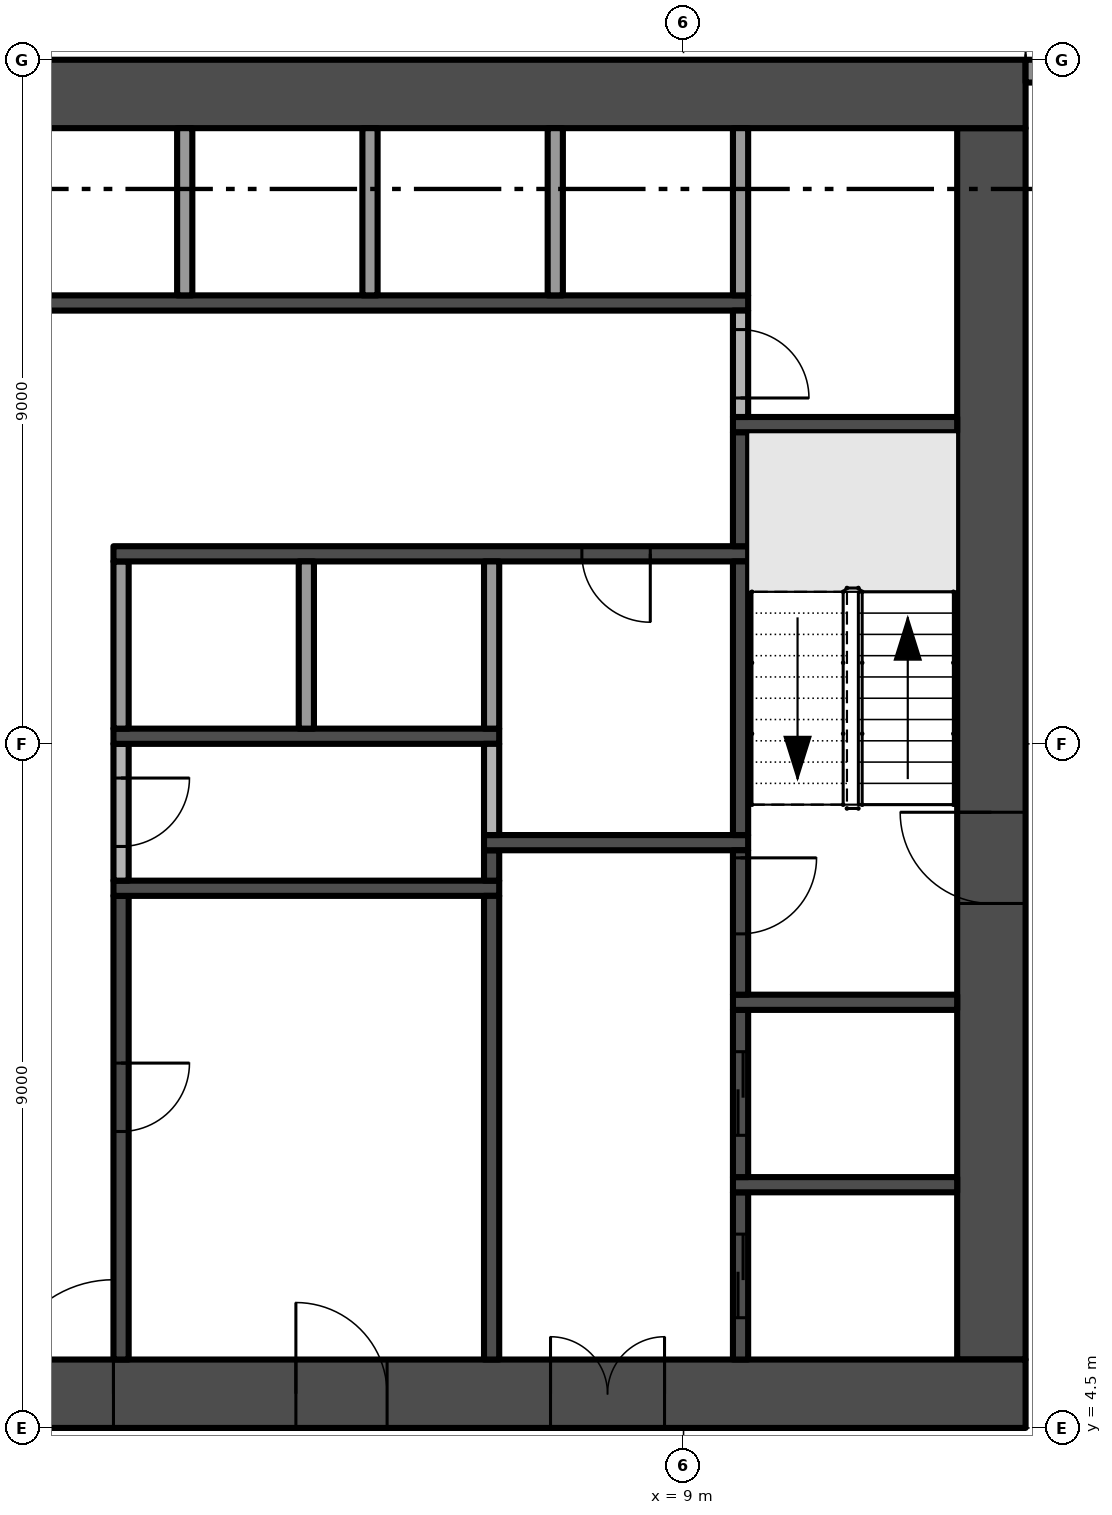
"""IFC4 building model, lengths in metres.
Left out: names, types, materials, properties, quantities, classifications, styles, units other than length and angle.
Written with IfcOpenShell. Run it as: python <this file> out.ifc"""

import sys

from ifc_helpers import new_model, si_unit, direction, frame, frame_2d, origin, place, context, subcontext, project, spatial, rectangle, extrude, element, fill, save


model = new_model("IFC4")
c1 = context("Model", 3, precision=1e-05, world=origin(), true_north=direction((0.0, 1.0)))
c2 = subcontext(c1, "Body", "Model", "MODEL_VIEW")
j1 = project(units=[si_unit("LENGTHUNIT", "METRE"), si_unit("PLANEANGLEUNIT", "RADIAN")], contexts=[c1])
p1 = place(None, origin())
s1 = spatial("IfcSite", under=j1, at=p1, CompositionType="ELEMENT")
p2 = place(p1, origin())
s2 = spatial("IfcBuilding", under=s1, at=p2, CompositionType="ELEMENT")
p3 = place(p2, frame((0.0, 0.0, 15.0)))
s3 = spatial("IfcBuildingStorey", under=s2, at=p3, CompositionType="ELEMENT", Elevation=15.0)
p4 = place(p3, frame((-13.5, 4.95, -0.3), z_axis=(0.0, 0.0, 1.0), x_axis=(1.0, 0.0, 0.0)))
e1 = element("IfcWall", 1, at=p4, inside=s3, PredefinedType="SHEAR", context=c2, shape_type="SweptSolid", body=[
    extrude(rectangle(XDim=27.0, YDim=0.9, at=frame_2d((13.5, 0.0))), origin(), (0.0, 0.0, 1.0), 3.8),
])
p5 = place(p4, frame((12.0, 0.0, 0.3)))
e2 = element("IfcOpeningElement", 2, at=p5, cuts=e1, PredefinedType="OPENING", context=c2, shape_type="SweptSolid", body=[
    extrude(rectangle(XDim=3.0, YDim=2.4, at=frame_2d((1.5, 1.2))), frame((0.0, 0.46, 0.0), z_axis=(0.0, -1.0, 0.0), x_axis=(1.0, 0.0, 0.0)), (0.0, 0.0, 1.0), 0.92),
])
p6 = place(p4, frame((4.9, 0.0, 0.3)))
e3 = element("IfcOpeningElement", 3, at=p6, cuts=e1, PredefinedType="OPENING", context=c2, shape_type="SweptSolid", body=[
    extrude(rectangle(XDim=1.2, YDim=2.2, at=frame_2d((0.6, 1.1))), frame((0.0, 0.46, 0.0), z_axis=(0.0, -1.0, 0.0), x_axis=(1.0, 0.0, 0.0)), (0.0, 0.0, 1.0), 0.92),
])
p7 = place(p4, frame((20.75, 0.0, 0.3)))
e4 = element("IfcOpeningElement", 4, at=p7, cuts=e1, PredefinedType="OPENING", context=c2, shape_type="SweptSolid", body=[
    extrude(rectangle(XDim=1.5, YDim=2.2, at=frame_2d((0.75, 1.1))), frame((0.0, 0.46, 0.0), z_axis=(0.0, -1.0, 0.0), x_axis=(1.0, 0.0, 0.0)), (0.0, 0.0, 1.0), 0.92),
])
p8 = place(p4, frame((17.4, 0.0, 0.3)))
e5 = element("IfcOpeningElement", 5, at=p8, cuts=e1, PredefinedType="OPENING", context=c2, shape_type="SweptSolid", body=[
    extrude(rectangle(XDim=1.2, YDim=2.2, at=frame_2d((0.6, 1.1))), frame((0.0, 0.46, 0.0), z_axis=(0.0, -1.0, 0.0), x_axis=(1.0, 0.0, 0.0)), (0.0, 0.0, 1.0), 0.92),
])
p9 = place(p3, frame((13.05, 5.4, -0.3), z_axis=(0.0, 0.0, 1.0), x_axis=(0.0, 1.0, 0.0)))
e6 = element("IfcWall", 6, at=p9, inside=s3, PredefinedType="SHEAR", context=c2, shape_type="SweptSolid", body=[
    extrude(rectangle(XDim=16.2, YDim=0.9, at=frame_2d((8.1, 0.0))), origin(), (0.0, 0.0, 1.0), 3.8),
])
p10 = place(p9, frame((6.0, 0.0, 0.3)))
e7 = element("IfcOpeningElement", 7, at=p10, cuts=e6, PredefinedType="OPENING", context=c2, shape_type="SweptSolid", body=[
    extrude(rectangle(XDim=1.2, YDim=2.2, at=frame_2d((0.6, 1.1))), frame((0.0, 0.46, 0.0), z_axis=(0.0, -1.0, 0.0), x_axis=(1.0, 0.0, 0.0)), (0.0, 0.0, 1.0), 0.92),
])
p11 = place(p3, frame((13.5, 22.05, -0.3), z_axis=(0.0, 0.0, 1.0), x_axis=(-1.0, 0.0, 0.0)))
e8 = element("IfcWall", 8, at=p11, inside=s3, PredefinedType="SHEAR", context=c2, shape_type="SweptSolid", body=[
    extrude(rectangle(XDim=27.0, YDim=0.9, at=frame_2d((13.5, 0.0))), origin(), (0.0, 0.0, 1.0), 3.8),
])
p12 = place(p3, frame((13.5, 22.35, 0.0), z_axis=(0.0, 0.0, 1.0), x_axis=(1.0, 0.0, 0.0)))
e9 = element("IfcWall", 9, at=p12, inside=s3, PredefinedType="SOLIDWALL", context=c2, shape_type="SweptSolid", body=[
    extrude(rectangle(XDim=3.75, YDim=0.3, at=frame_2d((1.875, 0.0))), origin(), (0.0, 0.0, 1.0), 3.5),
])
p13 = place(p12, frame((0.85, 0.0, 0.45)))
e10 = element("IfcOpeningElement", 10, at=p13, cuts=e9, PredefinedType="OPENING", context=c2, shape_type="SweptSolid", body=[
    extrude(rectangle(XDim=2.6, YDim=2.65, at=frame_2d((1.3, 1.325))), frame((0.0, 0.16, 0.0), z_axis=(0.0, -1.0, 0.0), x_axis=(1.0, 0.0, 0.0)), (0.0, 0.0, 1.0), 0.32),
])
p14 = place(p3, frame((-9.85, 19.3, 0.0), z_axis=(0.0, 0.0, 1.0), x_axis=(1.0, 0.0, 0.0)))
e11 = element("IfcWall", 11, at=p14, inside=s3, PredefinedType="SHEAR", context=c2, shape_type="SweptSolid", body=[
    extrude(rectangle(XDim=19.7, YDim=0.2, at=frame_2d((9.85, 0.0))), origin(), (0.0, 0.0, 1.0), 3.5),
])
p15 = place(p14, frame((0.769, 0.0, 0.0)))
e12 = element("IfcOpeningElement", 12, at=p15, cuts=e11, PredefinedType="OPENING", context=c2, shape_type="SweptSolid", body=[
    extrude(rectangle(XDim=1.1, YDim=2.1, at=frame_2d((0.55, 1.05))), frame((0.0, 0.11, 0.0), z_axis=(0.0, -1.0, 0.0), x_axis=(1.0, 0.0, 0.0)), (0.0, 0.0, 1.0), 0.22),
])
p16 = place(p14, frame((3.206, 0.0, 0.0)))
e13 = element("IfcOpeningElement", 13, at=p16, cuts=e11, PredefinedType="OPENING", context=c2, shape_type="SweptSolid", body=[
    extrude(rectangle(XDim=1.1, YDim=2.1, at=frame_2d((0.55, 1.05))), frame((0.0, 0.11, 0.0), z_axis=(0.0, -1.0, 0.0), x_axis=(1.0, 0.0, 0.0)), (0.0, 0.0, 1.0), 0.22),
])
p17 = place(p14, frame((5.644, 0.0, 0.0)))
e14 = element("IfcOpeningElement", 14, at=p17, cuts=e11, PredefinedType="OPENING", context=c2, shape_type="SweptSolid", body=[
    extrude(rectangle(XDim=1.1, YDim=2.1, at=frame_2d((0.55, 1.05))), frame((0.0, 0.11, 0.0), z_axis=(0.0, -1.0, 0.0), x_axis=(1.0, 0.0, 0.0)), (0.0, 0.0, 1.0), 0.22),
])
p18 = place(p14, frame((8.081, 0.0, 0.0)))
e15 = element("IfcOpeningElement", 15, at=p18, cuts=e11, PredefinedType="OPENING", context=c2, shape_type="SweptSolid", body=[
    extrude(rectangle(XDim=1.1, YDim=2.1, at=frame_2d((0.55, 1.05))), frame((0.0, 0.11, 0.0), z_axis=(0.0, -1.0, 0.0), x_axis=(1.0, 0.0, 0.0)), (0.0, 0.0, 1.0), 0.22),
])
p19 = place(p3, frame((1.6, 11.5, 0.0), z_axis=(0.0, 0.0, 1.0), x_axis=(0.0, -1.0, 0.0)))
e16 = element("IfcWall", 16, at=p19, inside=s3, PredefinedType="SHEAR", context=c2, shape_type="SweptSolid", body=[
    extrude(rectangle(XDim=6.1, YDim=0.2, at=frame_2d((3.05, 0.0))), origin(), (0.0, 0.0, 1.0), 3.5),
])
p20 = place(p19, frame((2.2, 0.0, 0.0)))
e17 = element("IfcOpeningElement", 17, at=p20, cuts=e16, PredefinedType="OPENING", context=c2, shape_type="SweptSolid", body=[
    extrude(rectangle(XDim=0.9, YDim=2.1, at=frame_2d((0.45, 1.05))), frame((0.0, 0.11, 0.0), z_axis=(0.0, -1.0, 0.0), x_axis=(1.0, 0.0, 0.0)), (0.0, 0.0, 1.0), 0.22),
])
p21 = place(p3, frame((1.5, 11.6, 0.0), z_axis=(0.0, 0.0, 1.0), x_axis=(1.0, 0.0, 0.0)))
e18 = element("IfcWall", 18, at=p21, inside=s3, PredefinedType="SHEAR", context=c2, shape_type="SweptSolid", body=[
    extrude(rectangle(XDim=5.075, YDim=0.2, at=frame_2d((2.538, 0.0))), origin(), (0.0, 0.0, 1.0), 3.5),
])
p22 = place(p3, frame((1.6, 13.5, 0.0), z_axis=(0.0, 0.0, 1.0), x_axis=(0.0, -1.0, 0.0)))
e19 = element("IfcWall", 19, at=p22, inside=s3, PredefinedType="PARTITIONING", context=c2, shape_type="SweptSolid", body=[
    extrude(rectangle(XDim=1.8, YDim=0.2, at=frame_2d((0.9, 0.0))), origin(), (0.0, 0.0, 1.0), 3.5),
])
p23 = place(p22, frame((0.45, 0.0, 0.0)))
e20 = element("IfcOpeningElement", 20, at=p23, cuts=e19, PredefinedType="OPENING", context=c2, shape_type="SweptSolid", body=[
    extrude(rectangle(XDim=0.9, YDim=2.1, at=frame_2d((0.45, 1.05))), frame((0.0, 0.11, 0.0), z_axis=(0.0, -1.0, 0.0), x_axis=(1.0, 0.0, 0.0)), (0.0, 0.0, 1.0), 0.22),
])
p24 = place(p3, frame((1.5, 13.6, 0.0), z_axis=(0.0, 0.0, 1.0), x_axis=(1.0, 0.0, 0.0)))
e21 = element("IfcWall", 21, at=p24, inside=s3, PredefinedType="SHEAR", context=c2, shape_type="SweptSolid", body=[
    extrude(rectangle(XDim=5.075, YDim=0.2, at=frame_2d((2.538, 0.0))), origin(), (0.0, 0.0, 1.0), 3.5),
])
p25 = place(p3, frame((1.6, 13.7, 0.0), z_axis=(0.0, 0.0, 1.0), x_axis=(0.0, 1.0, 0.0)))
e22 = element("IfcWall", 22, at=p25, inside=s3, PredefinedType="PARTITIONING", context=c2, shape_type="SweptSolid", body=[
    extrude(rectangle(XDim=2.2, YDim=0.2, at=frame_2d((1.1, 0.0))), origin(), (0.0, 0.0, 1.0), 3.5),
])
p26 = place(p3, frame((9.85, 16.0, 0.0), z_axis=(0.0, 0.0, 1.0), x_axis=(-1.0, 0.0, 0.0)))
e23 = element("IfcWall", 23, at=p26, inside=s3, PredefinedType="SHEAR", context=c2, shape_type="SweptSolid", body=[
    extrude(rectangle(XDim=8.35, YDim=0.2, at=frame_2d((4.175, 0.0))), origin(), (0.0, 0.0, 1.0), 3.5),
])
p27 = place(p26, frame((1.288, 0.0, 0.0)))
e24 = element("IfcOpeningElement", 24, at=p27, cuts=e23, PredefinedType="OPENING", context=c2, shape_type="SweptSolid", body=[
    extrude(rectangle(XDim=0.9, YDim=2.1, at=frame_2d((0.45, 1.05))), frame((0.0, 0.11, 0.0), z_axis=(0.0, -1.0, 0.0), x_axis=(1.0, 0.0, 0.0)), (0.0, 0.0, 1.0), 0.22),
])
for number, where, z_axis, x_axis in (
    (25, (2.438, 19.4, 0.0), (0.0, 0.0, 1.0), (0.0, 1.0, 0.0)),
    (26, (4.037, 13.7, 0.0), (0.0, 0.0, 1.0), (0.0, 1.0, 0.0)),
    (27, (4.875, 19.4, 0.0), (0.0, 0.0, 1.0), (0.0, 1.0, 0.0)),
):
    element("IfcWall", number, at=place(p3, frame(where, z_axis=z_axis, x_axis=x_axis)), inside=s3, PredefinedType="PARTITIONING", context=c2, shape_type="SweptSolid", body=[
        extrude(rectangle(XDim=2.2, YDim=0.2, at=frame_2d((1.1, 0.0))), origin(), (0.0, 0.0, 1.0), 3.5),
    ])
p28 = place(p3, frame((6.475, 5.4, 0.0), z_axis=(0.0, 0.0, 1.0), x_axis=(0.0, 1.0, 0.0)))
e28 = element("IfcWall", 28, at=p28, inside=s3, PredefinedType="SHEAR", context=c2, shape_type="SweptSolid", body=[
    extrude(rectangle(XDim=6.1, YDim=0.2, at=frame_2d((3.05, 0.0))), origin(), (0.0, 0.0, 1.0), 3.5),
])
p29 = place(p3, frame((6.475, 11.7, 0.0), z_axis=(0.0, 0.0, 1.0), x_axis=(0.0, 1.0, 0.0)))
e29 = element("IfcWall", 29, at=p29, inside=s3, PredefinedType="SHEAR", context=c2, shape_type="SweptSolid", body=[
    extrude(rectangle(XDim=0.4, YDim=0.2, at=frame_2d((0.2, 0.0))), origin(), (0.0, 0.0, 1.0), 3.5),
])
p30 = place(p3, frame((6.375, 12.2, 0.0), z_axis=(0.0, 0.0, 1.0), x_axis=(1.0, 0.0, 0.0)))
e30 = element("IfcWall", 30, at=p30, inside=s3, PredefinedType="SHEAR", context=c2, shape_type="SweptSolid", body=[
    extrude(rectangle(XDim=3.475, YDim=0.2, at=frame_2d((1.738, 0.0))), origin(), (0.0, 0.0, 1.0), 3.5),
])
p31 = place(p3, frame((6.475, 12.3, 0.0), z_axis=(0.0, 0.0, 1.0), x_axis=(0.0, 1.0, 0.0)))
e31 = element("IfcWall", 31, at=p31, inside=s3, PredefinedType="PARTITIONING", context=c2, shape_type="SweptSolid", body=[
    extrude(rectangle(XDim=1.2, YDim=0.2, at=frame_2d((0.6, 0.0))), origin(), (0.0, 0.0, 1.0), 3.5),
])
for number, where, z_axis, x_axis in (
    (32, (6.475, 13.7, 0.0), (0.0, 0.0, 1.0), (0.0, 1.0, 0.0)),
    (33, (7.312, 19.4, 0.0), (0.0, 0.0, 1.0), (0.0, 1.0, 0.0)),
):
    element("IfcWall", number, at=place(p3, frame(where, z_axis=z_axis, x_axis=x_axis)), inside=s3, PredefinedType="PARTITIONING", context=c2, shape_type="SweptSolid", body=[
        extrude(rectangle(XDim=2.2, YDim=0.2, at=frame_2d((1.1, 0.0))), origin(), (0.0, 0.0, 1.0), 3.5),
    ])
p32 = place(p3, frame((9.75, 5.4, 0.0), z_axis=(0.0, 0.0, 1.0), x_axis=(0.0, 1.0, 0.0)))
e34 = element("IfcWall", 34, at=p32, inside=s3, PredefinedType="SHEAR", context=c2, shape_type="SweptSolid", body=[
    extrude(rectangle(XDim=2.2, YDim=0.2, at=frame_2d((1.1, 0.0))), origin(), (0.0, 0.0, 1.0), 3.5),
])
p33 = place(p32, frame((0.55, 0.0, 0.0)))
e35 = element("IfcOpeningElement", 35, at=p33, cuts=e34, PredefinedType="OPENING", context=c2, shape_type="SweptSolid", body=[
    extrude(rectangle(XDim=1.1, YDim=2.1, at=frame_2d((0.55, 1.05))), frame((0.0, 0.11, 0.0), z_axis=(0.0, -1.0, 0.0), x_axis=(1.0, 0.0, 0.0)), (0.0, 0.0, 1.0), 0.22),
])
p34 = place(p3, frame((9.65, 7.7, 0.0), z_axis=(0.0, 0.0, 1.0), x_axis=(1.0, 0.0, 0.0)))
e36 = element("IfcWall", 36, at=p34, inside=s3, PredefinedType="SHEAR", context=c2, shape_type="SweptSolid", body=[
    extrude(rectangle(XDim=2.95, YDim=0.2, at=frame_2d((1.475, 0.0))), origin(), (0.0, 0.0, 1.0), 3.5),
])
p35 = place(p3, frame((9.75, 7.8, 0.0), z_axis=(0.0, 0.0, 1.0), x_axis=(0.0, 1.0, 0.0)))
e37 = element("IfcWall", 37, at=p35, inside=s3, PredefinedType="SHEAR", context=c2, shape_type="SweptSolid", body=[
    extrude(rectangle(XDim=2.2, YDim=0.2, at=frame_2d((1.1, 0.0))), origin(), (0.0, 0.0, 1.0), 3.5),
])
p36 = place(p35, frame((0.55, 0.0, 0.0)))
e38 = element("IfcOpeningElement", 38, at=p36, cuts=e37, PredefinedType="OPENING", context=c2, shape_type="SweptSolid", body=[
    extrude(rectangle(XDim=1.1, YDim=2.1, at=frame_2d((0.55, 1.05))), frame((0.0, 0.11, 0.0), z_axis=(0.0, -1.0, 0.0), x_axis=(1.0, 0.0, 0.0)), (0.0, 0.0, 1.0), 0.22),
])
p37 = place(p3, frame((9.65, 10.1, 0.0), z_axis=(0.0, 0.0, 1.0), x_axis=(1.0, 0.0, 0.0)))
e39 = element("IfcWall", 39, at=p37, inside=s3, PredefinedType="SHEAR", context=c2, shape_type="SweptSolid", body=[
    extrude(rectangle(XDim=2.95, YDim=0.2, at=frame_2d((1.475, 0.0))), origin(), (0.0, 0.0, 1.0), 3.5),
])
p38 = place(p3, frame((9.75, 12.1, 0.0), z_axis=(0.0, 0.0, 1.0), x_axis=(0.0, -1.0, 0.0)))
e40 = element("IfcWall", 40, at=p38, inside=s3, PredefinedType="SHEAR", context=c2, shape_type="SweptSolid", body=[
    extrude(rectangle(XDim=1.9, YDim=0.2, at=frame_2d((0.95, 0.0))), origin(), (0.0, 0.0, 1.0), 3.5),
])
p39 = place(p38, frame((0.1, 0.0, 0.0)))
e41 = element("IfcOpeningElement", 41, at=p39, cuts=e40, PredefinedType="OPENING", context=c2, shape_type="SweptSolid", body=[
    extrude(rectangle(XDim=1.0, YDim=2.2, at=frame_2d((0.5, 1.1))), frame((0.0, 0.11, 0.0), z_axis=(0.0, -1.0, 0.0), x_axis=(1.0, 0.0, 0.0)), (0.0, 0.0, 1.0), 0.22),
])
p40 = place(p3, frame((9.75, 12.3, 0.0), z_axis=(0.0, 0.0, 1.0), x_axis=(0.0, 1.0, 0.0)))
e42 = element("IfcWall", 42, at=p40, inside=s3, PredefinedType="SHEAR", context=c2, shape_type="SweptSolid", body=[
    extrude(rectangle(XDim=3.6, YDim=0.2, at=frame_2d((1.8, 0.0))), origin(), (0.0, 0.0, 1.0), 3.5),
])
p41 = place(p3, frame((9.75, 16.1, 0.0), z_axis=(0.0, 0.0, 1.0), x_axis=(0.0, 1.0, 0.0)))
e43 = element("IfcWall", 43, at=p41, inside=s3, PredefinedType="SHEAR", context=c2, shape_type="SweptSolid", body=[
    extrude(rectangle(XDim=1.5, YDim=0.2, at=frame_2d((0.75, 0.0))), origin(), (0.0, 0.0, 1.0), 3.5),
])
p42 = place(p3, frame((9.65, 17.7, 0.0), z_axis=(0.0, 0.0, 1.0), x_axis=(1.0, 0.0, 0.0)))
e44 = element("IfcWall", 44, at=p42, inside=s3, PredefinedType="SHEAR", context=c2, shape_type="SweptSolid", body=[
    extrude(rectangle(XDim=2.95, YDim=0.2, at=frame_2d((1.475, 0.0))), origin(), (0.0, 0.0, 1.0), 3.5),
])
p43 = place(p3, frame((9.75, 19.2, 0.0), z_axis=(0.0, 0.0, 1.0), x_axis=(0.0, -1.0, 0.0)))
e45 = element("IfcWall", 45, at=p43, inside=s3, PredefinedType="PARTITIONING", context=c2, shape_type="SweptSolid", body=[
    extrude(rectangle(XDim=1.4, YDim=0.2, at=frame_2d((0.7, 0.0))), origin(), (0.0, 0.0, 1.0), 3.5),
])
p44 = place(p43, frame((0.25, 0.0, 0.0)))
e46 = element("IfcOpeningElement", 46, at=p44, cuts=e45, PredefinedType="OPENING", context=c2, shape_type="SweptSolid", body=[
    extrude(rectangle(XDim=0.9, YDim=2.1, at=frame_2d((0.45, 1.05))), frame((0.0, 0.11, 0.0), z_axis=(0.0, -1.0, 0.0), x_axis=(1.0, 0.0, 0.0)), (0.0, 0.0, 1.0), 0.22),
])
p45 = place(p3, frame((9.75, 19.4, 0.0), z_axis=(0.0, 0.0, 1.0), x_axis=(0.0, 1.0, 0.0)))
e47 = element("IfcWall", 47, at=p45, inside=s3, PredefinedType="PARTITIONING", context=c2, shape_type="SweptSolid", body=[
    extrude(rectangle(XDim=2.2, YDim=0.2, at=frame_2d((1.1, 0.0))), origin(), (0.0, 0.0, 1.0), 3.5),
])
p46 = place(p5, frame((3.0, 0.0, 0.0), z_axis=(0.0, 0.0, 1.0), x_axis=(-1.0, 0.0, 0.0)))
e48 = element("IfcDoor", 48, at=p46, inside=s3, OperationType="DOUBLE_DOOR_SINGLE_SWING", PredefinedType="DOOR", context=c2, shape_type="SweptSolid", body=[
    extrude(rectangle(XDim=3.0, YDim=2.4, at=frame_2d((1.5, 1.2))), frame((0.0, 0.025, 0.0), z_axis=(0.0, -1.0, 0.0), x_axis=(1.0, 0.0, 0.0)), (0.0, 0.0, 1.0), 0.05),
])
fill(e2, e48)
p47 = place(p10, frame((1.2, 0.0, 0.0), z_axis=(0.0, 0.0, 1.0), x_axis=(-1.0, 0.0, 0.0)))
e49 = element("IfcDoor", 49, at=p47, inside=s3, OperationType="SINGLE_SWING_LEFT", PredefinedType="DOOR", context=c2, shape_type="SweptSolid", body=[
    extrude(rectangle(XDim=1.2, YDim=2.2, at=frame_2d((0.6, 1.1))), frame((0.0, 0.025, 0.0), z_axis=(0.0, -1.0, 0.0), x_axis=(1.0, 0.0, 0.0)), (0.0, 0.0, 1.0), 0.05),
])
fill(e7, e49)
p48 = place(p7, frame((1.5, 0.0, 0.0), z_axis=(0.0, 0.0, 1.0), x_axis=(-1.0, 0.0, 0.0)))
e50 = element("IfcDoor", 50, at=p48, inside=s3, OperationType="DOUBLE_DOOR_SINGLE_SWING", PredefinedType="DOOR", context=c2, shape_type="SweptSolid", body=[
    extrude(rectangle(XDim=1.5, YDim=2.2, at=frame_2d((0.75, 1.1))), frame((0.0, 0.025, 0.0), z_axis=(0.0, -1.0, 0.0), x_axis=(1.0, 0.0, 0.0)), (0.0, 0.0, 1.0), 0.05),
])
fill(e4, e50)
p49 = place(p8, frame((1.2, 0.0, 0.0), z_axis=(0.0, 0.0, 1.0), x_axis=(-1.0, 0.0, 0.0)))
e51 = element("IfcDoor", 51, at=p49, inside=s3, OperationType="SINGLE_SWING_RIGHT", PredefinedType="DOOR", context=c2, shape_type="SweptSolid", body=[
    extrude(rectangle(XDim=1.2, YDim=2.2, at=frame_2d((0.6, 1.1))), frame((0.0, 0.025, 0.0), z_axis=(0.0, -1.0, 0.0), x_axis=(1.0, 0.0, 0.0)), (0.0, 0.0, 1.0), 0.05),
])
fill(e5, e51)
p50 = place(p39, origin())
e52 = element("IfcDoor", 52, at=p50, inside=s3, OperationType="SINGLE_SWING_LEFT", PredefinedType="DOOR", context=c2, shape_type="SweptSolid", body=[
    extrude(rectangle(XDim=1.0, YDim=2.2, at=frame_2d((0.5, 1.1))), frame((0.0, 0.025, 0.0), z_axis=(0.0, -1.0, 0.0), x_axis=(1.0, 0.0, 0.0)), (0.0, 0.0, 1.0), 0.05),
])
fill(e41, e52)
p51 = place(p33, origin())
e53 = element("IfcDoor", 53, at=p51, inside=s3, OperationType="SLIDING_TO_RIGHT", PredefinedType="DOOR", context=c2, shape_type="SweptSolid", body=[
    extrude(rectangle(XDim=1.1, YDim=2.1, at=frame_2d((0.55, 1.05))), frame((0.0, 0.025, 0.0), z_axis=(0.0, -1.0, 0.0), x_axis=(1.0, 0.0, 0.0)), (0.0, 0.0, 1.0), 0.05),
])
fill(e35, e53)
p52 = place(p36, origin())
e54 = element("IfcDoor", 54, at=p52, inside=s3, OperationType="SLIDING_TO_RIGHT", PredefinedType="DOOR", context=c2, shape_type="SweptSolid", body=[
    extrude(rectangle(XDim=1.1, YDim=2.1, at=frame_2d((0.55, 1.05))), frame((0.0, 0.025, 0.0), z_axis=(0.0, -1.0, 0.0), x_axis=(1.0, 0.0, 0.0)), (0.0, 0.0, 1.0), 0.05),
])
fill(e38, e54)
p53 = place(p20, origin())
e55 = element("IfcDoor", 55, at=p53, inside=s3, OperationType="SINGLE_SWING_LEFT", PredefinedType="DOOR", context=c2, shape_type="SweptSolid", body=[
    extrude(rectangle(XDim=0.9, YDim=2.1, at=frame_2d((0.45, 1.05))), frame((0.0, 0.025, 0.0), z_axis=(0.0, -1.0, 0.0), x_axis=(1.0, 0.0, 0.0)), (0.0, 0.0, 1.0), 0.05),
])
fill(e17, e55)
p54 = place(p23, origin())
e56 = element("IfcDoor", 56, at=p54, inside=s3, OperationType="SINGLE_SWING_LEFT", PredefinedType="DOOR", context=c2, shape_type="SweptSolid", body=[
    extrude(rectangle(XDim=0.9, YDim=2.1, at=frame_2d((0.45, 1.05))), frame((0.0, 0.025, 0.0), z_axis=(0.0, -1.0, 0.0), x_axis=(1.0, 0.0, 0.0)), (0.0, 0.0, 1.0), 0.05),
])
fill(e20, e56)
p55 = place(p27, origin())
e57 = element("IfcDoor", 57, at=p55, inside=s3, OperationType="SINGLE_SWING_LEFT", PredefinedType="DOOR", context=c2, shape_type="SweptSolid", body=[
    extrude(rectangle(XDim=0.9, YDim=2.1, at=frame_2d((0.45, 1.05))), frame((0.0, 0.025, 0.0), z_axis=(0.0, -1.0, 0.0), x_axis=(1.0, 0.0, 0.0)), (0.0, 0.0, 1.0), 0.05),
])
fill(e24, e57)
p56 = place(p44, origin())
e58 = element("IfcDoor", 58, at=p56, inside=s3, OperationType="SINGLE_SWING_RIGHT", PredefinedType="DOOR", context=c2, shape_type="SweptSolid", body=[
    extrude(rectangle(XDim=0.9, YDim=2.1, at=frame_2d((0.45, 1.05))), frame((0.0, 0.025, 0.0), z_axis=(0.0, -1.0, 0.0), x_axis=(1.0, 0.0, 0.0)), (0.0, 0.0, 1.0), 0.05),
])
fill(e46, e58)
save(model, sys.argv[1])
